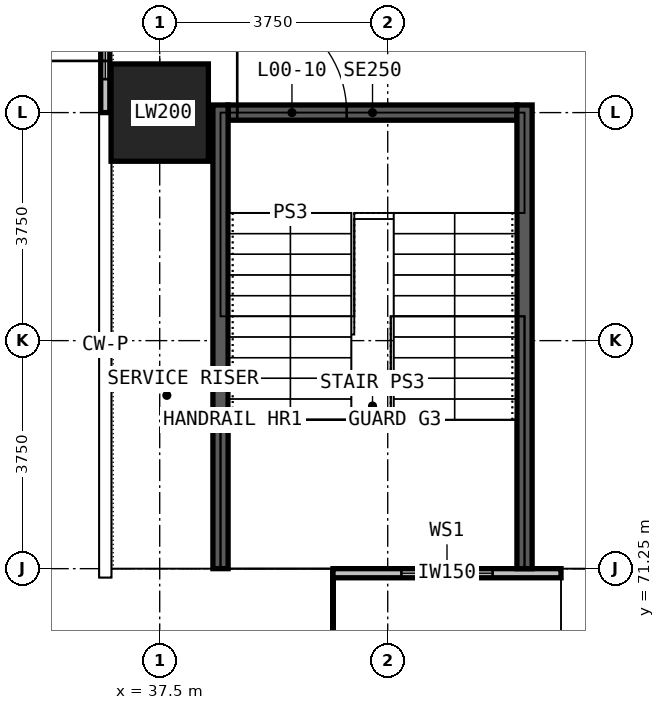
"""IFC4 building model, lengths in metres.
Left out: names, types, materials, properties, quantities, classifications, styles, units other than length and angle.
Written with IfcOpenShell. Run it as: python <this file> out.ifc"""

import sys

from ifc_helpers import new_model, si_unit, direction, frame, frame_2d, origin, origin_2d, place, context, subcontext, project, spatial, polyline, rectangle, outline, extrude, element, fill, save


model = new_model("IFC4")
c1 = context("Model", 3, precision=1e-05, world=origin(), true_north=direction((0.0, 1.0)))
c2 = subcontext(c1, "Body", "Model", "MODEL_VIEW")
j1 = project(units=[si_unit("LENGTHUNIT", "METRE"), si_unit("PLANEANGLEUNIT", "RADIAN")], contexts=[c1])
p1 = place(None, origin())
s1 = spatial("IfcSite", under=j1, at=p1, CompositionType="ELEMENT")
p2 = place(p1, origin())
s2 = spatial("IfcBuilding", under=s1, at=p2, CompositionType="ELEMENT")
p3 = place(p2, origin())
s3 = spatial("IfcBuildingStorey", under=s2, at=p3, CompositionType="ELEMENT", Elevation=0.0)
p4 = place(p3, frame((40.35, 71.25, 7.5), z_axis=(1.0, 0.0, 0.0), x_axis=(0.0, -1.0, 0.0)))
e1 = element("IfcWall", 1, at=p4, inside=s3, PredefinedType="SHEAR", context=c2, shape_type="SweptSolid", body=[
    extrude(outline(polyline([(0.0, 0.0), (4.351, 0.0), (3.75, 1.5), (3.75, 7.5), (0.0, 7.5), (0.0, 0.0)])), origin(), (0.0, 0.0, -1.0), 3.75),
])
p5 = place(p3, frame((45.9, 71.25, 7.5), z_axis=(1.0, 0.0, 0.0), x_axis=(0.0, -1.0, 0.0)))
e2 = element("IfcWall", 2, at=p5, inside=s3, PredefinedType="SHEAR", context=c2, shape_type="SweptSolid", body=[
    extrude(outline(polyline([(0.0, 0.0), (4.351, 0.0), (3.75, 1.5), (3.75, 7.5), (0.0, 7.5), (0.0, 0.0)])), origin(), (0.0, 0.0, -1.0), 1.8),
])
p6 = place(p3, frame((37.5, 78.75, 0.0), z_axis=(0.0, 0.0, 1.0), x_axis=(1.0, 0.0, 0.0)))
e3 = element("IfcColumn", 3, at=p6, inside=s3, PredefinedType="COLUMN", context=c2, shape_type="SweptSolid", body=[
    extrude(rectangle(XDim=1.6, YDim=1.6, at=origin_2d()), origin(), (0.0, 0.0, 1.0), 7.5),
])
p7 = place(p3, frame((36.605, 78.75, 0.0), z_axis=(0.0, 0.0, 1.0), x_axis=(0.0, 1.0, 0.0)))
e4 = element("IfcWall", 4, at=p7, inside=s3, PredefinedType="SOLIDWALL", context=c2, shape_type="SweptSolid", body=[
    extrude(rectangle(XDim=3.75, YDim=0.15, at=frame_2d((1.875, 0.0))), origin(), (0.0, 0.0, 1.0), 7.15),
])
p8 = place(p7, frame((0.85, 0.0, 0.0)))
e5 = element("IfcOpeningElement", 5, at=p8, cuts=e4, PredefinedType="OPENING", context=c2, shape_type="SweptSolid", body=[
    extrude(rectangle(XDim=2.4, YDim=2.7, at=frame_2d((1.2, 1.35))), frame((0.0, 0.085, 0.0), z_axis=(0.0, -1.0, 0.0), x_axis=(1.0, 0.0, 0.0)), (0.0, 0.0, 1.0), 0.17),
])
p9 = place(p7, frame((0.55, 0.0, 3.0)))
e6 = element("IfcOpeningElement", 6, at=p9, cuts=e4, PredefinedType="OPENING", context=c2, shape_type="SweptSolid", body=[
    extrude(rectangle(XDim=3.0, YDim=3.6, at=frame_2d((1.5, 1.8))), frame((0.0, 0.085, 0.0), z_axis=(0.0, -1.0, 0.0), x_axis=(1.0, 0.0, 0.0)), (0.0, 0.0, 1.0), 0.17),
])
p10 = place(p3, frame((44.1, 71.175, 0.0), z_axis=(0.0, 0.0, 1.0), x_axis=(-1.0, 0.0, 0.0)))
e7 = element("IfcWall", 7, at=p10, inside=s3, PredefinedType="SOLIDWALL", context=c2, shape_type="SweptSolid", body=[
    extrude(rectangle(XDim=3.75, YDim=0.15, at=frame_2d((1.875, 0.0))), origin(), (0.0, 0.0, 1.0), 7.15),
])
p11 = place(p10, frame((1.125, 0.0, 0.6)))
e8 = element("IfcOpeningElement", 8, at=p11, cuts=e7, PredefinedType="OPENING", context=c2, shape_type="SweptSolid", body=[
    extrude(rectangle(XDim=1.5, YDim=3.0, at=frame_2d((0.75, 1.5))), frame((0.0, 0.085, 0.0), z_axis=(0.0, -1.0, 0.0), x_axis=(1.0, 0.0, 0.0)), (0.0, 0.0, 1.0), 0.17),
])
p12 = place(p3, frame((36.735, 78.75, 0.0), z_axis=(0.0, 0.0, 1.0), x_axis=(1.0, 0.0, 0.0)))
e9 = element("IfcWall", 9, at=p12, inside=s3, PredefinedType="PARTITIONING", context=c2, shape_type="SweptSolid", body=[
    extrude(rectangle(XDim=1.64, YDim=0.2, at=frame_2d((0.82, 0.0))), origin(), (0.0, 0.0, 1.0), 7.15),
])
p13 = place(p3, frame((38.625, 78.75, 0.0), z_axis=(0.0, 0.0, 1.0), x_axis=(1.0, 0.0, 0.0)))
e10 = element("IfcWall", 10, at=p13, inside=s3, PredefinedType="PARTITIONING", context=c2, shape_type="SweptSolid", body=[
    extrude(rectangle(XDim=4.75, YDim=0.25, at=frame_2d((2.375, 0.0))), origin(), (0.0, 0.0, 1.0), 7.15),
])
p14 = place(p13, frame((0.15, 0.0, 0.0)))
e11 = element("IfcOpeningElement", 11, at=p14, cuts=e10, PredefinedType="OPENING", context=c2, shape_type="SweptSolid", body=[
    extrude(rectangle(XDim=1.8, YDim=2.2, at=frame_2d((0.9, 1.1))), frame((0.0, 0.135, 0.0), z_axis=(0.0, -1.0, 0.0), x_axis=(1.0, 0.0, 0.0)), (0.0, 0.0, 1.0), 0.27),
])
for number, where, z_axis, x_axis in (
    (12, (38.5, 71.25, 0.0), (0.0, 0.0, 1.0), (0.0, 1.0, 0.0)),
    (13, (43.5, 71.25, 0.0), (0.0, 0.0, 1.0), (0.0, 1.0, 0.0)),
):
    element("IfcWall", number, at=place(p3, frame(where, z_axis=z_axis, x_axis=x_axis)), inside=s3, PredefinedType="PARTITIONING", context=c2, shape_type="SweptSolid", body=[
        extrude(rectangle(XDim=7.625, YDim=0.25, at=frame_2d((3.812, 0.0))), origin(), (0.0, 0.0, 1.0), 7.15),
    ])
p15 = place(p8, origin())
e14 = element("IfcDoor", 14, at=p15, inside=s3, OperationType="DOUBLE_DOOR_SINGLE_SWING", PredefinedType="DOOR", context=c2, shape_type="SweptSolid", body=[
    extrude(rectangle(XDim=2.4, YDim=2.7, at=frame_2d((1.2, 1.35))), frame((0.0, 0.025, 0.0), z_axis=(0.0, -1.0, 0.0), x_axis=(1.0, 0.0, 0.0)), (0.0, 0.0, 1.0), 0.05),
])
fill(e5, e14)
p16 = place(p9, origin())
e15 = element("IfcWindow", 15, at=p16, inside=s3, PartitioningType="SINGLE_PANEL", PredefinedType="WINDOW", context=c2, shape_type="SweptSolid", body=[
    extrude(rectangle(XDim=3.0, YDim=3.6, at=frame_2d((1.5, 1.8))), frame((0.0, 0.03, 0.0), z_axis=(0.0, -1.0, 0.0), x_axis=(1.0, 0.0, 0.0)), (0.0, 0.0, 1.0), 0.06),
])
fill(e6, e15)
p17 = place(p11, origin())
e16 = element("IfcWindow", 16, at=p17, inside=s3, PartitioningType="SINGLE_PANEL", PredefinedType="WINDOW", context=c2, shape_type="SweptSolid", body=[
    extrude(rectangle(XDim=1.5, YDim=3.0, at=frame_2d((0.75, 1.5))), frame((0.0, 0.03, 0.0), z_axis=(0.0, -1.0, 0.0), x_axis=(1.0, 0.0, 0.0)), (0.0, 0.0, 1.0), 0.06),
])
fill(e8, e16)
p18 = place(p14, origin())
e17 = element("IfcDoor", 17, at=p18, inside=s3, OperationType="DOUBLE_DOOR_SINGLE_SWING", PredefinedType="DOOR", context=c2, shape_type="SweptSolid", body=[
    extrude(rectangle(XDim=1.8, YDim=2.2, at=frame_2d((0.9, 1.1))), frame((0.0, 0.025, 0.0), z_axis=(0.0, -1.0, 0.0), x_axis=(1.0, 0.0, 0.0)), (0.0, 0.0, 1.0), 0.05),
])
fill(e11, e17)
save(model, sys.argv[1])
